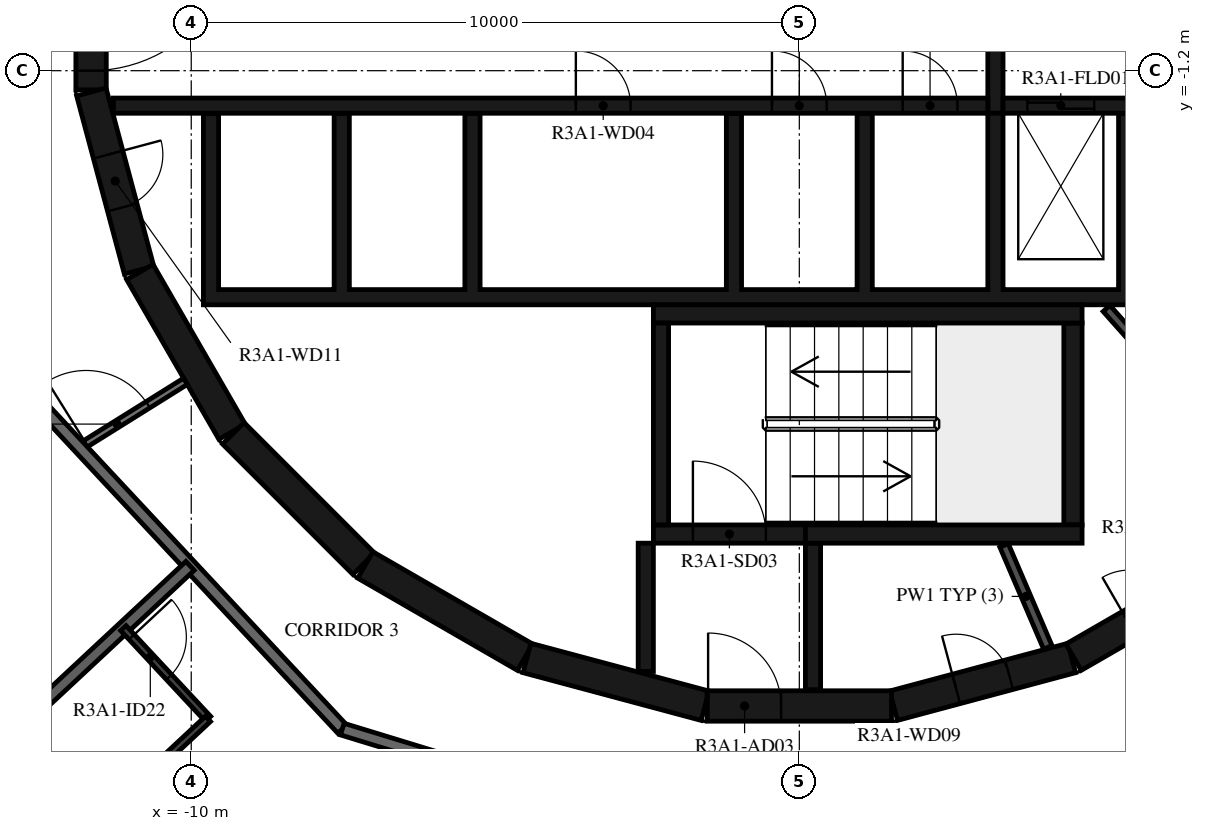
"""IFC4 building model, lengths in metres.
Left out: names, types, materials, properties, quantities, classifications, styles, units other than length and angle.
Written with IfcOpenShell. Run it as: python <this file> out.ifc"""

import sys

from ifc_helpers import new_model, si_unit, direction, frame, frame_2d, origin, place, context, subcontext, project, spatial, polyline, rectangle, outline, extrude, element, fill, save


model = new_model("IFC4")
c1 = context("Model", 3, precision=1e-05, world=origin(), true_north=direction((0.0, 1.0)))
c2 = subcontext(c1, "Body", "Model", "MODEL_VIEW")
j1 = project(units=[si_unit("LENGTHUNIT", "METRE"), si_unit("PLANEANGLEUNIT", "RADIAN")], contexts=[c1])
p1 = place(None, origin())
s1 = spatial("IfcSite", under=j1, at=p1, CompositionType="ELEMENT")
p2 = place(p1, origin())
s2 = spatial("IfcBuilding", under=s1, at=p2, CompositionType="ELEMENT")
p3 = place(p2, frame((0.0, 0.0, 116.9)))
s3 = spatial("IfcBuildingStorey", under=s2, at=p3, CompositionType="ELEMENT", Elevation=116.9)
p4 = place(p3, frame((1.55, -11.643, 0.0), z_axis=(0.0, 0.0, 1.0), x_axis=(0.965948410781, 0.258734743916, 0.0)))
e1 = element("IfcWall", 1, at=p4, inside=s3, PredefinedType="SHEAR", context=c2, shape_type="SweptSolid", body=[
    extrude(rectangle(XDim=3.033, YDim=0.5, at=frame_2d((1.516, 0.0))), origin(), (0.0, 0.0, 1.0), 3.12),
])
p5 = place(p4, frame((1.066, 0.0, 0.0)))
e2 = element("IfcOpeningElement", 2, at=p5, cuts=e1, PredefinedType="OPENING", context=c2, shape_type="SweptSolid", body=[
    extrude(rectangle(XDim=0.9, YDim=2.1, at=frame_2d((0.45, 1.05))), frame((0.0, 0.26, 0.0), z_axis=(0.0, -1.0, 0.0), x_axis=(1.0, 0.0, 0.0)), (0.0, 0.0, 1.0), 0.52),
])
p6 = place(p3, frame((4.51, -10.845, 0.0), z_axis=(0.0, 0.0, 1.0), x_axis=(0.865975092491, 0.500087131594, 0.0)))
e3 = element("IfcWall", 3, at=p6, inside=s3, PredefinedType="SHEAR", context=c2, shape_type="SweptSolid", body=[
    extrude(rectangle(XDim=3.033, YDim=0.5, at=frame_2d((1.516, 0.0))), origin(), (0.0, 0.0, 1.0), 3.12),
])
p7 = place(p6, frame((1.066, 0.0, 0.0)))
e4 = element("IfcOpeningElement", 4, at=p7, cuts=e3, PredefinedType="OPENING", context=c2, shape_type="SweptSolid", body=[
    extrude(rectangle(XDim=0.9, YDim=2.1, at=frame_2d((0.45, 1.05))), frame((0.0, 0.26, 0.0), z_axis=(0.0, -1.0, 0.0), x_axis=(1.0, 0.0, 0.0)), (0.0, 0.0, 1.0), 0.52),
])
p8 = place(p3, frame((-11.647, 1.516, 0.0), z_axis=(0.0, 0.0, 1.0), x_axis=(0.0, -1.0, 0.0)))
e5 = element("IfcWall", 5, at=p8, inside=s3, PredefinedType="SHEAR", context=c2, shape_type="SweptSolid", body=[
    extrude(rectangle(XDim=3.033, YDim=0.5, at=frame_2d((1.516, 0.0))), origin(), (0.0, 0.0, 1.0), 3.12),
])
p9 = place(p8, frame((0.316, 0.0, 0.0)))
e6 = element("IfcOpeningElement", 6, at=p9, cuts=e5, PredefinedType="OPENING", context=c2, shape_type="SweptSolid", body=[
    extrude(rectangle(XDim=2.4, YDim=2.1, at=frame_2d((1.2, 1.05))), frame((0.0, 0.26, 0.0), z_axis=(0.0, -1.0, 0.0), x_axis=(1.0, 0.0, 0.0)), (0.0, 0.0, 1.0), 0.52),
])
p10 = place(p3, frame((-11.643, -1.55, 0.0), z_axis=(0.0, 0.0, 1.0), x_axis=(0.258734743916, -0.965948410781, 0.0)))
e7 = element("IfcWall", 7, at=p10, inside=s3, PredefinedType="SHEAR", context=c2, shape_type="SweptSolid", body=[
    extrude(rectangle(XDim=3.033, YDim=0.5, at=frame_2d((1.516, 0.0))), origin(), (0.0, 0.0, 1.0), 3.12),
])
p11 = place(p10, frame((1.066, 0.0, 0.0)))
e8 = element("IfcOpeningElement", 8, at=p11, cuts=e7, PredefinedType="OPENING", context=c2, shape_type="SweptSolid", body=[
    extrude(rectangle(XDim=0.9, YDim=2.1, at=frame_2d((0.45, 1.05))), frame((0.0, 0.26, 0.0), z_axis=(0.0, -1.0, 0.0), x_axis=(1.0, 0.0, 0.0)), (0.0, 0.0, 1.0), 0.52),
])
p12 = place(p3, frame((-10.845, -4.51, 0.0), z_axis=(0.0, 0.0, 1.0), x_axis=(0.500087131594, -0.865975092491, 0.0)))
e9 = element("IfcWall", 9, at=p12, inside=s3, PredefinedType="SHEAR", context=c2, shape_type="SweptSolid", body=[
    extrude(rectangle(XDim=3.033, YDim=0.5, at=frame_2d((1.516, 0.0))), origin(), (0.0, 0.0, 1.0), 3.12),
])
p13 = place(p3, frame((-9.308, -7.164, 0.0), z_axis=(0.0, 0.0, 1.0), x_axis=(0.707106781187, -0.707106781187, 0.0)))
e10 = element("IfcWall", 10, at=p13, inside=s3, PredefinedType="SHEAR", context=c2, shape_type="SweptSolid", body=[
    extrude(rectangle(XDim=3.032, YDim=0.5, at=frame_2d((1.516, 0.0))), origin(), (0.0, 0.0, 1.0), 3.12),
])
for number, where, z_axis, x_axis in (
    (11, (-7.137, -9.329, 0.0), (0.0, 0.0, 1.0), (0.866, -0.5, 0.0)),
    (12, (-4.479, -10.858, 0.0), (0.0, 0.0, 1.0), (0.966, -0.259, 0.0)),
):
    element("IfcWall", number, at=place(p3, frame(where, z_axis=z_axis, x_axis=x_axis)), inside=s3, PredefinedType="SHEAR", context=c2, shape_type="SweptSolid", body=[
        extrude(rectangle(XDim=3.033, YDim=0.5, at=frame_2d((1.516, 0.0))), origin(), (0.0, 0.0, 1.0), 3.12),
    ])
p14 = place(p3, frame((-1.516, -11.647, 0.0), z_axis=(0.0, 0.0, 1.0), x_axis=(1.0, 0.0, 0.0)))
e13 = element("IfcWall", 13, at=p14, inside=s3, PredefinedType="SHEAR", context=c2, shape_type="SweptSolid", body=[
    extrude(rectangle(XDim=3.033, YDim=0.5, at=frame_2d((1.516, 0.0))), origin(), (0.0, 0.0, 1.0), 3.12),
])
p15 = place(p14, frame((0.016, 0.0, 0.0)))
e14 = element("IfcOpeningElement", 14, at=p15, cuts=e13, PredefinedType="OPENING", context=c2, shape_type="SweptSolid", body=[
    extrude(rectangle(XDim=1.2, YDim=2.1, at=frame_2d((0.6, 1.05))), frame((0.0, 0.26, 0.0), z_axis=(0.0, -1.0, 0.0), x_axis=(1.0, 0.0, 0.0)), (0.0, 0.0, 1.0), 0.52),
])
p16 = place(p3, frame((-2.275, -8.67, 0.0), z_axis=(0.0, 0.0, 1.0), x_axis=(0.0, 1.0, 0.0)))
e15 = element("IfcWall", 15, at=p16, inside=s3, PredefinedType="SHEAR", context=c2, shape_type="SweptSolid", body=[
    extrude(rectangle(XDim=3.32, YDim=0.25, at=frame_2d((1.66, 0.0))), origin(), (0.0, 0.0, 1.0), 3.12),
])
p17 = place(p3, frame((-2.4, -5.2, 0.0), z_axis=(0.0, 0.0, 1.0), x_axis=(1.0, 0.0, 0.0)))
e16 = element("IfcWall", 16, at=p17, inside=s3, PredefinedType="SHEAR", context=c2, shape_type="SweptSolid", body=[
    extrude(rectangle(XDim=7.05, YDim=0.3, at=frame_2d((3.525, 0.0))), origin(), (0.0, 0.0, 1.0), 3.12),
])
p18 = place(p3, frame((4.5, -8.67, 0.0), z_axis=(0.0, 0.0, 1.0), x_axis=(0.0, 1.0, 0.0)))
e17 = element("IfcWall", 17, at=p18, inside=s3, PredefinedType="SHEAR", context=c2, shape_type="SweptSolid", body=[
    extrude(rectangle(XDim=3.32, YDim=0.3, at=frame_2d((1.66, 0.0))), origin(), (0.0, 0.0, 1.0), 3.12),
])
p19 = place(p3, frame((0.1, -8.82, 0.0), z_axis=(0.0, 0.0, 1.0), x_axis=(1.0, 0.0, 0.0)))
e18 = element("IfcWall", 18, at=p19, inside=s3, PredefinedType="SHEAR", context=c2, shape_type="SweptSolid", body=[
    extrude(rectangle(XDim=4.55, YDim=0.3, at=frame_2d((2.275, 0.0))), origin(), (0.0, 0.0, 1.0), 3.12),
])
p20 = place(p3, frame((-2.4, -8.82, 0.0), z_axis=(0.0, 0.0, 1.0), x_axis=(1.0, 0.0, 0.0)))
e19 = element("IfcWall", 19, at=p20, inside=s3, PredefinedType="SHEAR", context=c2, shape_type="SweptSolid", body=[
    extrude(rectangle(XDim=2.5, YDim=0.3, at=frame_2d((1.25, 0.0))), origin(), (0.0, 0.0, 1.0), 3.12),
])
p21 = place(p20, frame((0.65, 0.0, 0.0)))
e20 = element("IfcOpeningElement", 20, at=p21, cuts=e19, PredefinedType="OPENING", context=c2, shape_type="SweptSolid", body=[
    extrude(rectangle(XDim=1.2, YDim=2.1, at=frame_2d((0.6, 1.05))), frame((0.0, 0.16, 0.0), z_axis=(0.0, -1.0, 0.0), x_axis=(1.0, 0.0, 0.0)), (0.0, 0.0, 1.0), 0.32),
])
p22 = place(p3, frame((-2.525, -8.97, 0.0), z_axis=(0.0, 0.0, 1.0), x_axis=(0.0, -1.0, 0.0)))
e21 = element("IfcWall", 21, at=p22, inside=s3, PredefinedType="SHEAR", context=c2, shape_type="SweptSolid", body=[
    extrude(rectangle(XDim=2.11, YDim=0.25, at=frame_2d((1.055, 0.0))), origin(), (0.0, 0.0, 1.0), 3.12),
])
p23 = place(p3, frame((0.225, -8.97, 0.0), z_axis=(0.0, 0.0, 1.0), x_axis=(0.0, -1.0, 0.0)))
e22 = element("IfcWall", 22, at=p23, inside=s3, PredefinedType="SHEAR", context=c2, shape_type="SweptSolid", body=[
    extrude(rectangle(XDim=2.41, YDim=0.25, at=frame_2d((1.205, 0.0))), origin(), (0.0, 0.0, 1.0), 3.12),
])
p24 = place(p3, origin())
e23 = element("IfcWall", 23, at=p24, inside=s3, PredefinedType="SHEAR", context=c2, shape_type="SweptSolid", body=[
    extrude(outline(polyline([(9.8, -5.05), (9.8, -4.8), (9.8, -1.9), (9.55, -1.9), (9.55, -4.8), (7.65, -4.8), (7.65, -1.9), (7.4, -1.9), (7.4, -4.8), (5.5, -4.8), (5.5, -1.9), (5.25, -1.9), (5.25, -4.8), (3.35, -4.8), (3.35, -1.9), (3.1, -1.9), (3.1, -4.8), (1.2, -4.8), (1.2, -1.9), (0.95, -1.9), (0.95, -4.8), (-0.95, -4.8), (-0.95, -1.9), (-1.2, -1.9), (-1.2, -4.8), (-5.25, -4.8), (-5.25, -1.9), (-5.5, -1.9), (-5.5, -4.8), (-7.4, -4.8), (-7.4, -1.9), (-7.65, -1.9), (-7.65, -4.8), (-9.55, -4.8), (-9.55, -1.9), (-9.8, -1.9), (-9.8, -4.8), (-9.8, -5.05), (9.8, -5.05)])), origin(), (0.0, 0.0, 1.0), 3.12),
])
p25 = place(p3, frame((-11.28, -1.775, 0.0), z_axis=(0.0, 0.0, 1.0), x_axis=(1.0, 0.0, 0.0)))
e24 = element("IfcWall", 24, at=p25, inside=s3, PredefinedType="SHEAR", context=c2, shape_type="SweptSolid", body=[
    extrude(rectangle(XDim=14.38, YDim=0.25, at=frame_2d((7.19, 0.0))), origin(), (0.0, 0.0, 1.0), 3.12),
])
p26 = place(p25, frame((7.605, 0.0, 0.0)))
e25 = element("IfcOpeningElement", 25, at=p26, cuts=e24, PredefinedType="OPENING", context=c2, shape_type="SweptSolid", body=[
    extrude(rectangle(XDim=0.9, YDim=2.1, at=frame_2d((0.45, 1.05))), frame((0.0, 0.135, 0.0), z_axis=(0.0, -1.0, 0.0), x_axis=(1.0, 0.0, 0.0)), (0.0, 0.0, 1.0), 0.27),
])
p27 = place(p25, frame((10.83, 0.0, 0.0)))
e26 = element("IfcOpeningElement", 26, at=p27, cuts=e24, PredefinedType="OPENING", context=c2, shape_type="SweptSolid", body=[
    extrude(rectangle(XDim=0.9, YDim=2.1, at=frame_2d((0.45, 1.05))), frame((0.0, 0.135, 0.0), z_axis=(0.0, -1.0, 0.0), x_axis=(1.0, 0.0, 0.0)), (0.0, 0.0, 1.0), 0.27),
])
p28 = place(p25, frame((12.98, 0.0, 0.0)))
e27 = element("IfcOpeningElement", 27, at=p28, cuts=e24, PredefinedType="OPENING", context=c2, shape_type="SweptSolid", body=[
    extrude(rectangle(XDim=0.9, YDim=2.1, at=frame_2d((0.45, 1.05))), frame((0.0, 0.135, 0.0), z_axis=(0.0, -1.0, 0.0), x_axis=(1.0, 0.0, 0.0)), (0.0, 0.0, 1.0), 0.27),
])
p29 = place(p3, frame((3.35, -1.775, 0.0), z_axis=(0.0, 0.0, 1.0), x_axis=(1.0, 0.0, 0.0)))
e28 = element("IfcWall", 28, at=p29, inside=s3, PredefinedType="SHEAR", context=c2, shape_type="SweptSolid", body=[
    extrude(rectangle(XDim=7.93, YDim=0.25, at=frame_2d((3.965, 0.0))), origin(), (0.0, 0.0, 1.0), 3.12),
])
p30 = place(p29, frame((0.4, 0.0, 0.0)))
e29 = element("IfcOpeningElement", 29, at=p30, cuts=e28, PredefinedType="OPENING", context=c2, shape_type="SweptSolid", body=[
    extrude(rectangle(XDim=1.1, YDim=2.4, at=frame_2d((0.55, 1.2))), frame((0.0, 0.135, 0.0), z_axis=(0.0, -1.0, 0.0), x_axis=(1.0, 0.0, 0.0)), (0.0, 0.0, 1.0), 0.27),
])
p31 = place(p29, frame((2.55, 0.0, 0.0)))
e30 = element("IfcOpeningElement", 30, at=p31, cuts=e28, PredefinedType="OPENING", context=c2, shape_type="SweptSolid", body=[
    extrude(rectangle(XDim=1.1, YDim=2.4, at=frame_2d((0.55, 1.2))), frame((0.0, 0.135, 0.0), z_axis=(0.0, -1.0, 0.0), x_axis=(1.0, 0.0, 0.0)), (0.0, 0.0, 1.0), 0.27),
])
p32 = place(p29, frame((4.7, 0.0, 0.0)))
e31 = element("IfcOpeningElement", 31, at=p32, cuts=e28, PredefinedType="OPENING", context=c2, shape_type="SweptSolid", body=[
    extrude(rectangle(XDim=1.1, YDim=2.4, at=frame_2d((0.55, 1.2))), frame((0.0, 0.135, 0.0), z_axis=(0.0, -1.0, 0.0), x_axis=(1.0, 0.0, 0.0)), (0.0, 0.0, 1.0), 0.27),
])
p33 = place(p3, frame((3.225, -1.9, 0.0), z_axis=(0.0, 0.0, 1.0), x_axis=(0.0, 1.0, 0.0)))
e32 = element("IfcWall", 32, at=p33, inside=s3, PredefinedType="SHEAR", context=c2, shape_type="SweptSolid", body=[
    extrude(rectangle(XDim=3.8, YDim=0.25, at=frame_2d((1.9, 0.0))), origin(), (0.0, 0.0, 1.0), 3.12),
])
p34 = place(p3, frame((7.842, -8.248, 0.0), z_axis=(0.0, 0.0, 1.0), x_axis=(-0.66446128181, 0.747322691329, 0.0)))
e33 = element("IfcWall", 33, at=p34, inside=s3, PredefinedType="PARTITIONING", context=c2, shape_type="SweptSolid", body=[
    extrude(rectangle(XDim=4.198, YDim=0.15, at=frame_2d((2.099, 0.0))), origin(), (0.0, 0.0, 1.0), 3.12),
])
p35 = place(p3, frame((3.367, -9.007, 0.0), z_axis=(0.0, 0.0, 1.0), x_axis=(0.394387482265, -0.918944238696, 0.0)))
e34 = element("IfcWall", 34, at=p35, inside=s3, PredefinedType="PARTITIONING", context=c2, shape_type="SweptSolid", body=[
    extrude(rectangle(XDim=1.825, YDim=0.15, at=frame_2d((0.913, 0.0))), origin(), (0.0, 0.0, 1.0), 3.12),
])
p36 = place(p3, frame((-11.836, -7.396, 0.0), z_axis=(0.0, 0.0, 1.0), x_axis=(0.848071831599, 0.529881277692, 0.0)))
e35 = element("IfcWall", 35, at=p36, inside=s3, PredefinedType="PARTITIONING", context=c2, shape_type="SweptSolid", body=[
    extrude(rectangle(XDim=2.052, YDim=0.12, at=frame_2d((1.026, 0.0))), origin(), (0.0, 0.0, 1.0), 3.12),
])
p37 = place(p36, frame((0.125, 0.0, 0.0)))
e36 = element("IfcOpeningElement", 36, at=p37, cuts=e35, PredefinedType="OPENING", context=c2, shape_type="SweptSolid", body=[
    extrude(rectangle(XDim=1.2, YDim=2.1, at=frame_2d((0.6, 1.05))), frame((0.0, 0.07, 0.0), z_axis=(0.0, -1.0, 0.0), x_axis=(1.0, 0.0, 0.0)), (0.0, 0.0, 1.0), 0.14),
])
p38 = place(p3, frame((-12.523, -6.659, 0.0), z_axis=(0.0, 0.0, 1.0), x_axis=(0.682001841105, -0.731350455479, 0.0)))
e37 = element("IfcWall", 37, at=p38, inside=s3, PredefinedType="STANDARD", context=c2, shape_type="SweptSolid", body=[
    extrude(rectangle(XDim=7.342, YDim=0.2, at=frame_2d((3.671, 0.0))), origin(), (0.0, 0.0, 1.0), 3.12),
])
p39 = place(p3, frame((-7.516, -12.028, 0.0), z_axis=(0.0, 0.0, 1.0), x_axis=(0.956306642771, -0.292365533182, 0.0)))
e38 = element("IfcWall", 38, at=p39, inside=s3, PredefinedType="STANDARD", context=c2, shape_type="SweptSolid", body=[
    extrude(rectangle(XDim=7.342, YDim=0.2, at=frame_2d((3.671, 0.0))), origin(), (0.0, 0.0, 1.0), 3.12),
])
p40 = place(p39, frame((5.745, 0.0, 0.0)))
e39 = element("IfcOpeningElement", 39, at=p40, cuts=e38, PredefinedType="OPENING", context=c2, shape_type="SweptSolid", body=[
    extrude(rectangle(XDim=1.0, YDim=2.1, at=frame_2d((0.5, 1.05))), frame((0.0, 0.11, 0.0), z_axis=(0.0, -1.0, 0.0), x_axis=(1.0, 0.0, 0.0)), (0.0, 0.0, 1.0), 0.22),
])
p41 = place(p3, frame((-13.699, -12.774, 0.0), z_axis=(0.0, 0.0, 1.0), x_axis=(0.731353758457, 0.681998299111, 0.0)))
e40 = element("IfcWall", 40, at=p41, inside=s3, PredefinedType="STANDARD", context=c2, shape_type="SweptSolid", body=[
    extrude(rectangle(XDim=5.031, YDim=0.2, at=frame_2d((2.515, 0.0))), origin(), (0.0, 0.0, 1.0), 3.12),
])
p42 = place(p3, frame((-11.117, -10.366, 0.0), z_axis=(0.0, 0.0, 1.0), x_axis=(0.682041233274, -0.731313719353, 0.0)))
e41 = element("IfcWall", 41, at=p42, inside=s3, PredefinedType="PARTITIONING", context=c2, shape_type="SweptSolid", body=[
    extrude(rectangle(XDim=2.042, YDim=0.12, at=frame_2d((1.021, 0.0))), origin(), (0.0, 0.0, 1.0), 3.12),
])
p43 = place(p42, frame((0.2, 0.0, 0.0)))
e42 = element("IfcOpeningElement", 42, at=p43, cuts=e41, PredefinedType="OPENING", context=c2, shape_type="SweptSolid", body=[
    extrude(rectangle(XDim=0.9, YDim=2.1, at=frame_2d((0.45, 1.05))), frame((0.0, 0.07, 0.0), z_axis=(0.0, -1.0, 0.0), x_axis=(1.0, 0.0, 0.0)), (0.0, 0.0, 1.0), 0.14),
])
p44 = place(p3, frame((-9.724, -11.859, 0.0), z_axis=(0.0, 0.0, 1.0), x_axis=(-0.731365154613, -0.681986078023, 0.0)))
e43 = element("IfcWall", 43, at=p44, inside=s3, PredefinedType="PARTITIONING", context=c2, shape_type="SweptSolid", body=[
    extrude(rectangle(XDim=4.4, YDim=0.12, at=frame_2d((2.2, 0.0))), origin(), (0.0, 0.0, 1.0), 3.12),
])
p45 = place(p21, origin())
e44 = element("IfcDoor", 44, at=p45, inside=s3, OperationType="SINGLE_SWING_LEFT", PredefinedType="DOOR", context=c2, shape_type="SweptSolid", body=[
    extrude(rectangle(XDim=1.2, YDim=2.1, at=frame_2d((0.6, 1.05))), frame((0.0, 0.025, 0.0), z_axis=(0.0, -1.0, 0.0), x_axis=(1.0, 0.0, 0.0)), (0.0, 0.0, 1.0), 0.05),
])
fill(e20, e44)
p46 = place(p15, origin())
e45 = element("IfcDoor", 45, at=p46, inside=s3, OperationType="SINGLE_SWING_RIGHT", PredefinedType="DOOR", context=c2, shape_type="SweptSolid", body=[
    extrude(rectangle(XDim=1.2, YDim=2.1, at=frame_2d((0.6, 1.05))), frame((0.0, 0.025, 0.0), z_axis=(0.0, -1.0, 0.0), x_axis=(1.0, 0.0, 0.0)), (0.0, 0.0, 1.0), 0.05),
])
fill(e14, e45)
p47 = place(p9, origin())
e46 = element("IfcDoor", 46, at=p47, inside=s3, OperationType="DOUBLE_DOOR_SINGLE_SWING", PredefinedType="DOOR", context=c2, shape_type="SweptSolid", body=[
    extrude(rectangle(XDim=2.4, YDim=2.1, at=frame_2d((1.2, 1.05))), frame((0.0, 0.025, 0.0), z_axis=(0.0, -1.0, 0.0), x_axis=(1.0, 0.0, 0.0)), (0.0, 0.0, 1.0), 0.05),
])
fill(e6, e46)
p48 = place(p30, origin())
e47 = element("IfcDoor", 47, at=p48, inside=s3, OperationType="DOUBLE_DOOR_SLIDING", PredefinedType="DOOR", context=c2, shape_type="SweptSolid", body=[
    extrude(rectangle(XDim=1.1, YDim=2.4, at=frame_2d((0.55, 1.2))), frame((0.0, 0.025, 0.0), z_axis=(0.0, -1.0, 0.0), x_axis=(1.0, 0.0, 0.0)), (0.0, 0.0, 1.0), 0.05),
])
fill(e29, e47)
p49 = place(p26, origin())
e48 = element("IfcDoor", 48, at=p49, inside=s3, OperationType="SINGLE_SWING_LEFT", PredefinedType="DOOR", context=c2, shape_type="SweptSolid", body=[
    extrude(rectangle(XDim=0.9, YDim=2.1, at=frame_2d((0.45, 1.05))), frame((0.0, 0.025, 0.0), z_axis=(0.0, -1.0, 0.0), x_axis=(1.0, 0.0, 0.0)), (0.0, 0.0, 1.0), 0.05),
])
fill(e25, e48)
p50 = place(p27, origin())
e49 = element("IfcDoor", 49, at=p50, inside=s3, OperationType="SINGLE_SWING_RIGHT", PredefinedType="DOOR", context=c2, shape_type="SweptSolid", body=[
    extrude(rectangle(XDim=0.9, YDim=2.1, at=frame_2d((0.45, 1.05))), frame((0.0, 0.025, 0.0), z_axis=(0.0, -1.0, 0.0), x_axis=(1.0, 0.0, 0.0)), (0.0, 0.0, 1.0), 0.05),
])
fill(e26, e49)
p51 = place(p28, origin())
e50 = element("IfcDoor", 50, at=p51, inside=s3, OperationType="SINGLE_SWING_LEFT", PredefinedType="DOOR", context=c2, shape_type="SweptSolid", body=[
    extrude(rectangle(XDim=0.9, YDim=2.1, at=frame_2d((0.45, 1.05))), frame((0.0, 0.025, 0.0), z_axis=(0.0, -1.0, 0.0), x_axis=(1.0, 0.0, 0.0)), (0.0, 0.0, 1.0), 0.05),
])
fill(e27, e50)
p52 = place(p5, origin())
e51 = element("IfcDoor", 51, at=p52, inside=s3, OperationType="SINGLE_SWING_RIGHT", PredefinedType="DOOR", context=c2, shape_type="SweptSolid", body=[
    extrude(rectangle(XDim=0.9, YDim=2.1, at=frame_2d((0.45, 1.05))), frame((0.0, 0.025, 0.0), z_axis=(0.0, -1.0, 0.0), x_axis=(1.0, 0.0, 0.0)), (0.0, 0.0, 1.0), 0.05),
])
fill(e2, e51)
p53 = place(p11, origin())
e52 = element("IfcDoor", 52, at=p53, inside=s3, OperationType="SINGLE_SWING_RIGHT", PredefinedType="DOOR", context=c2, shape_type="SweptSolid", body=[
    extrude(rectangle(XDim=0.9, YDim=2.1, at=frame_2d((0.45, 1.05))), frame((0.0, 0.025, 0.0), z_axis=(0.0, -1.0, 0.0), x_axis=(1.0, 0.0, 0.0)), (0.0, 0.0, 1.0), 0.05),
])
fill(e8, e52)
p54 = place(p43, origin())
e53 = element("IfcDoor", 53, at=p54, inside=s3, OperationType="SINGLE_SWING_LEFT", PredefinedType="DOOR", context=c2, shape_type="SweptSolid", body=[
    extrude(rectangle(XDim=0.9, YDim=2.1, at=frame_2d((0.45, 1.05))), frame((0.0, 0.025, 0.0), z_axis=(0.0, -1.0, 0.0), x_axis=(1.0, 0.0, 0.0)), (0.0, 0.0, 1.0), 0.05),
])
fill(e42, e53)
p55 = place(p37, origin())
e54 = element("IfcDoor", 54, at=p55, inside=s3, OperationType="DOUBLE_DOOR_SINGLE_SWING", PredefinedType="DOOR", context=c2, shape_type="SweptSolid", body=[
    extrude(rectangle(XDim=1.2, YDim=2.1, at=frame_2d((0.6, 1.05))), frame((0.0, 0.025, 0.0), z_axis=(0.0, -1.0, 0.0), x_axis=(1.0, 0.0, 0.0)), (0.0, 0.0, 1.0), 0.05),
])
fill(e36, e54)
save(model, sys.argv[1])
